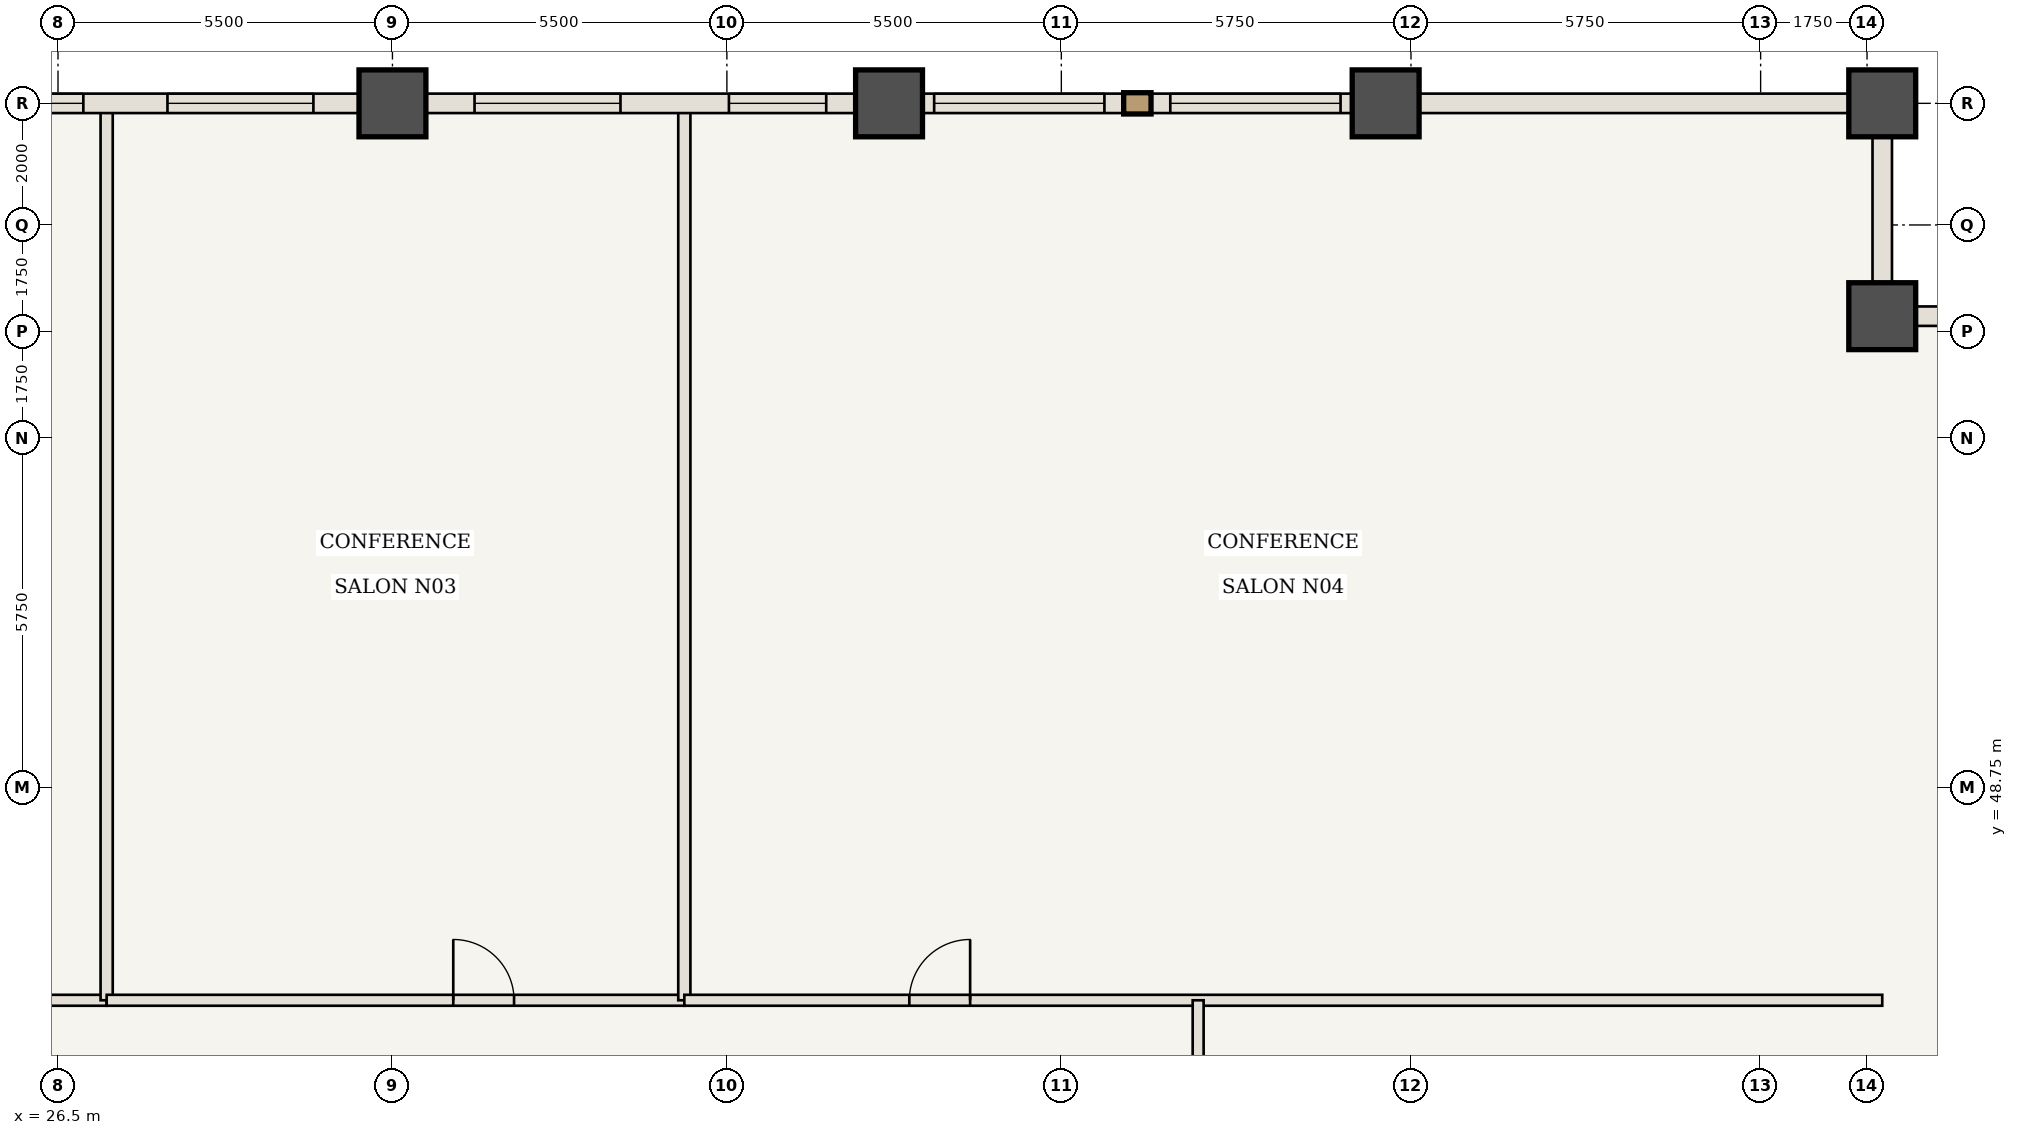
"""IFC4 building model, lengths in metres.
Left out: names, types, materials, properties, quantities, classifications, styles, units other than length and angle.
Written with IfcOpenShell. Run it as: python <this file> out.ifc"""

import sys

from ifc_helpers import new_model, si_unit, direction, frame, frame_2d, origin, origin_2d, place, context, subcontext, project, spatial, rectangle, extrude, element, fill, save


model = new_model("IFC4")
c1 = context("Model", 3, precision=1e-05, world=origin(), true_north=direction((0.0, 1.0)))
c2 = subcontext(c1, "Body", "Model", "MODEL_VIEW")
j1 = project(units=[si_unit("LENGTHUNIT", "METRE"), si_unit("PLANEANGLEUNIT", "RADIAN")], contexts=[c1])
p1 = place(None, origin())
s1 = spatial("IfcSite", under=j1, at=p1, CompositionType="ELEMENT")
p2 = place(p1, origin())
s2 = spatial("IfcBuilding", under=s1, at=p2, CompositionType="ELEMENT")
p3 = place(p2, frame((0.0, 0.0, 85.75)))
s3 = spatial("IfcBuildingStorey", under=s2, at=p3, CompositionType="ELEMENT", Elevation=85.75)
for number, where, z_axis, x_axis in (
    (1, (56.5, 56.5, 0.0), (0.0, 0.0, 1.0), (1.0, 0.0, 0.0)),
    (2, (56.5, 60.0, 0.0), (0.0, 0.0, 1.0), (1.0, 0.0, 0.0)),
    (3, (32.0, 60.0, 0.0), (0.0, 0.0, 1.0), (1.0, 0.0, 0.0)),
    (4, (40.167, 60.0, 0.0), (0.0, 0.0, 1.0), (1.0, 0.0, 0.0)),
    (5, (48.333, 60.0, 0.0), (0.0, 0.0, 1.0), (1.0, 0.0, 0.0)),
):
    element("IfcColumn", number, at=place(p3, frame(where, z_axis=z_axis, x_axis=x_axis)), inside=s3, PredefinedType="COLUMN", context=c2, shape_type="SweptSolid", body=[
        extrude(rectangle(XDim=1.1, YDim=1.1, at=origin_2d()), origin(), (0.0, 0.0, 1.0), 3.5),
    ])
p4 = place(p3, frame((22.5, 45.25, 0.0), z_axis=(0.0, 0.0, 1.0), x_axis=(1.0, 0.0, 0.0)))
e6 = element("IfcWall", 6, at=p4, inside=s3, PredefinedType="STANDARD", context=c2, shape_type="SweptSolid", body=[
    extrude(rectangle(XDim=4.8, YDim=0.18, at=frame_2d((2.4, 0.0))), origin(), (0.0, 0.0, 1.0), 3.32),
])
p5 = place(p4, frame((1.9, 0.0, 0.0)))
e7 = element("IfcOpeningElement", 7, at=p5, cuts=e6, PredefinedType="OPENING", context=c2, shape_type="SweptSolid", body=[
    extrude(rectangle(XDim=1.0, YDim=2.15, at=frame_2d((0.5, 1.075))), frame((0.0, 0.1, 0.0), z_axis=(0.0, -1.0, 0.0), x_axis=(1.0, 0.0, 0.0)), (0.0, 0.0, 1.0), 0.2),
])
p6 = place(p3, frame((27.3, 45.25, 0.0), z_axis=(0.0, 0.0, 1.0), x_axis=(0.0, 1.0, 0.0)))
e8 = element("IfcWall", 8, at=p6, inside=s3, PredefinedType="STANDARD", context=c2, shape_type="SweptSolid", body=[
    extrude(rectangle(XDim=14.69, YDim=0.2, at=frame_2d((7.345, 0.0))), origin(), (0.0, 0.0, 1.0), 3.32),
])
p7 = place(p3, frame((27.3, 45.25, 0.0), z_axis=(0.0, 0.0, 1.0), x_axis=(1.0, 0.0, 0.0)))
e9 = element("IfcWall", 9, at=p7, inside=s3, PredefinedType="STANDARD", context=c2, shape_type="SweptSolid", body=[
    extrude(rectangle(XDim=9.5, YDim=0.18, at=frame_2d((4.75, 0.0))), origin(), (0.0, 0.0, 1.0), 3.32),
])
p8 = place(p7, frame((5.7, 0.0, 0.0)))
e10 = element("IfcOpeningElement", 10, at=p8, cuts=e9, PredefinedType="OPENING", context=c2, shape_type="SweptSolid", body=[
    extrude(rectangle(XDim=1.0, YDim=2.15, at=frame_2d((0.5, 1.075))), frame((0.0, 0.1, 0.0), z_axis=(0.0, -1.0, 0.0), x_axis=(1.0, 0.0, 0.0)), (0.0, 0.0, 1.0), 0.2),
])
p9 = place(p3, frame((36.8, 45.25, 0.0), z_axis=(0.0, 0.0, 1.0), x_axis=(0.0, 1.0, 0.0)))
e11 = element("IfcWall", 11, at=p9, inside=s3, PredefinedType="STANDARD", context=c2, shape_type="SweptSolid", body=[
    extrude(rectangle(XDim=14.69, YDim=0.2, at=frame_2d((7.345, 0.0))), origin(), (0.0, 0.0, 1.0), 3.32),
])
p10 = place(p3, frame((36.8, 45.25, 0.0), z_axis=(0.0, 0.0, 1.0), x_axis=(1.0, 0.0, 0.0)))
e12 = element("IfcWall", 12, at=p10, inside=s3, PredefinedType="STANDARD", context=c2, shape_type="SweptSolid", body=[
    extrude(rectangle(XDim=19.7, YDim=0.18, at=frame_2d((9.85, 0.0))), origin(), (0.0, 0.0, 1.0), 3.32),
])
p11 = place(p10, frame((3.7, 0.0, 0.0)))
e13 = element("IfcOpeningElement", 13, at=p11, cuts=e12, PredefinedType="OPENING", context=c2, shape_type="SweptSolid", body=[
    extrude(rectangle(XDim=1.0, YDim=2.15, at=frame_2d((0.5, 1.075))), frame((0.0, 0.1, 0.0), z_axis=(0.0, -1.0, 0.0), x_axis=(1.0, 0.0, 0.0)), (0.0, 0.0, 1.0), 0.2),
])
p12 = place(p3, frame((45.25, 31.0, 0.0), z_axis=(0.0, 0.0, 1.0), x_axis=(0.0, 1.0, 0.0)))
e14 = element("IfcWall", 14, at=p12, inside=s3, PredefinedType="STANDARD", context=c2, shape_type="SweptSolid", body=[
    extrude(rectangle(XDim=14.25, YDim=0.18, at=frame_2d((7.125, 0.0))), origin(), (0.0, 0.0, 1.0), 3.32),
])
p13 = place(p12, frame((6.625, 0.0, 0.0)))
e15 = element("IfcOpeningElement", 15, at=p13, cuts=e14, PredefinedType="OPENING", context=c2, shape_type="SweptSolid", body=[
    extrude(rectangle(XDim=1.0, YDim=2.15, at=frame_2d((0.5, 1.075))), frame((0.0, 0.1, 0.0), z_axis=(0.0, -1.0, 0.0), x_axis=(1.0, 0.0, 0.0)), (0.0, 0.0, 1.0), 0.2),
])
p14 = place(p3, frame((23.833, 60.0, 0.0), z_axis=(0.0, 0.0, 1.0), x_axis=(1.0, 0.0, 0.0)))
e16 = element("IfcWall", 16, at=p14, inside=s3, PredefinedType="USERDEFINED", context=c2, shape_type="SweptSolid", body=[
    extrude(rectangle(XDim=8.167, YDim=0.32, at=frame_2d((4.083, 0.0))), origin(), (0.0, 0.0, 1.0), 2.52),
])
p15 = place(p14, frame((0.683, 0.0, 0.85)))
e17 = element("IfcOpeningElement", 17, at=p15, cuts=e16, PredefinedType="OPENING", context=c2, shape_type="SweptSolid", body=[
    extrude(rectangle(XDim=2.4, YDim=1.47, at=frame_2d((1.2, 0.735))), frame((0.0, 0.17, 0.0), z_axis=(0.0, -1.0, 0.0), x_axis=(1.0, 0.0, 0.0)), (0.0, 0.0, 1.0), 0.34),
])
p16 = place(p14, frame((4.467, 0.0, 0.85)))
e18 = element("IfcOpeningElement", 18, at=p16, cuts=e16, PredefinedType="OPENING", context=c2, shape_type="SweptSolid", body=[
    extrude(rectangle(XDim=2.4, YDim=1.47, at=frame_2d((1.2, 0.735))), frame((0.0, 0.17, 0.0), z_axis=(0.0, -1.0, 0.0), x_axis=(1.0, 0.0, 0.0)), (0.0, 0.0, 1.0), 0.34),
])
p17 = place(p3, frame((32.0, 60.0, 0.0), z_axis=(0.0, 0.0, 1.0), x_axis=(1.0, 0.0, 0.0)))
e19 = element("IfcWall", 19, at=p17, inside=s3, PredefinedType="USERDEFINED", context=c2, shape_type="SweptSolid", body=[
    extrude(rectangle(XDim=8.167, YDim=0.32, at=frame_2d((4.083, 0.0))), origin(), (0.0, 0.0, 1.0), 2.52),
])
p18 = place(p17, frame((1.35, 0.0, 0.85)))
e20 = element("IfcOpeningElement", 20, at=p18, cuts=e19, PredefinedType="OPENING", context=c2, shape_type="SweptSolid", body=[
    extrude(rectangle(XDim=2.4, YDim=1.47, at=frame_2d((1.2, 0.735))), frame((0.0, 0.17, 0.0), z_axis=(0.0, -1.0, 0.0), x_axis=(1.0, 0.0, 0.0)), (0.0, 0.0, 1.0), 0.34),
])
p19 = place(p17, frame((5.533, 0.0, 0.85)))
e21 = element("IfcOpeningElement", 21, at=p19, cuts=e19, PredefinedType="OPENING", context=c2, shape_type="SweptSolid", body=[
    extrude(rectangle(XDim=1.6, YDim=1.47, at=frame_2d((0.8, 0.735))), frame((0.0, 0.17, 0.0), z_axis=(0.0, -1.0, 0.0), x_axis=(1.0, 0.0, 0.0)), (0.0, 0.0, 1.0), 0.34),
])
p20 = place(p3, frame((40.167, 60.0, 0.0), z_axis=(0.0, 0.0, 1.0), x_axis=(1.0, 0.0, 0.0)))
e22 = element("IfcWall", 22, at=p20, inside=s3, PredefinedType="USERDEFINED", context=c2, shape_type="SweptSolid", body=[
    extrude(rectangle(XDim=8.167, YDim=0.32, at=frame_2d((4.083, 0.0))), origin(), (0.0, 0.0, 1.0), 2.52),
])
p21 = place(p20, frame((0.742, 0.0, 0.85)))
e23 = element("IfcOpeningElement", 23, at=p21, cuts=e22, PredefinedType="OPENING", context=c2, shape_type="SweptSolid", body=[
    extrude(rectangle(XDim=2.8, YDim=1.47, at=frame_2d((1.4, 0.735))), frame((0.0, 0.17, 0.0), z_axis=(0.0, -1.0, 0.0), x_axis=(1.0, 0.0, 0.0)), (0.0, 0.0, 1.0), 0.34),
])
p22 = place(p20, frame((4.625, 0.0, 0.85)))
e24 = element("IfcOpeningElement", 24, at=p22, cuts=e22, PredefinedType="OPENING", context=c2, shape_type="SweptSolid", body=[
    extrude(rectangle(XDim=2.8, YDim=1.47, at=frame_2d((1.4, 0.735))), frame((0.0, 0.17, 0.0), z_axis=(0.0, -1.0, 0.0), x_axis=(1.0, 0.0, 0.0)), (0.0, 0.0, 1.0), 0.34),
])
p23 = place(p3, frame((48.333, 60.0, 0.0), z_axis=(0.0, 0.0, 1.0), x_axis=(1.0, 0.0, 0.0)))
e25 = element("IfcWall", 25, at=p23, inside=s3, PredefinedType="USERDEFINED", context=c2, shape_type="SweptSolid", body=[
    extrude(rectangle(XDim=8.167, YDim=0.32, at=frame_2d((4.083, 0.0))), origin(), (0.0, 0.0, 1.0), 2.52),
])
for number, where, z_axis, x_axis in (
    (26, (56.5, 56.5, 0.0), (0.0, 0.0, 1.0), (1.0, 0.0, 0.0)),
    (27, (56.5, 60.0, 0.0), (0.0, 0.0, 1.0), (0.0, -1.0, 0.0)),
):
    element("IfcWall", number, at=place(p3, frame(where, z_axis=z_axis, x_axis=x_axis)), inside=s3, PredefinedType="USERDEFINED", context=c2, shape_type="SweptSolid", body=[
        extrude(rectangle(XDim=3.5, YDim=0.32, at=frame_2d((1.75, 0.0))), origin(), (0.0, 0.0, 1.0), 2.52),
    ])
p24 = place(p8, origin())
e28 = element("IfcDoor", 28, at=p24, inside=s3, OperationType="SINGLE_SWING_LEFT", PredefinedType="DOOR", context=c2, shape_type="SweptSolid", body=[
    extrude(rectangle(XDim=1.0, YDim=2.15, at=frame_2d((0.5, 1.075))), frame((0.0, 0.025, 0.0), z_axis=(0.0, -1.0, 0.0), x_axis=(1.0, 0.0, 0.0)), (0.0, 0.0, 1.0), 0.05),
])
fill(e10, e28)
p25 = place(p11, origin())
e29 = element("IfcDoor", 29, at=p25, inside=s3, OperationType="SINGLE_SWING_RIGHT", PredefinedType="DOOR", context=c2, shape_type="SweptSolid", body=[
    extrude(rectangle(XDim=1.0, YDim=2.15, at=frame_2d((0.5, 1.075))), frame((0.0, 0.025, 0.0), z_axis=(0.0, -1.0, 0.0), x_axis=(1.0, 0.0, 0.0)), (0.0, 0.0, 1.0), 0.05),
])
fill(e13, e29)
p26 = place(p15, origin())
e30 = element("IfcWindow", 30, at=p26, inside=s3, PartitioningType="SINGLE_PANEL", PredefinedType="WINDOW", context=c2, shape_type="SweptSolid", body=[
    extrude(rectangle(XDim=2.4, YDim=1.47, at=frame_2d((1.2, 0.735))), frame((0.0, 0.03, 0.0), z_axis=(0.0, -1.0, 0.0), x_axis=(1.0, 0.0, 0.0)), (0.0, 0.0, 1.0), 0.06),
])
fill(e17, e30)
p27 = place(p16, origin())
e31 = element("IfcWindow", 31, at=p27, inside=s3, PartitioningType="SINGLE_PANEL", PredefinedType="WINDOW", context=c2, shape_type="SweptSolid", body=[
    extrude(rectangle(XDim=2.4, YDim=1.47, at=frame_2d((1.2, 0.735))), frame((0.0, 0.03, 0.0), z_axis=(0.0, -1.0, 0.0), x_axis=(1.0, 0.0, 0.0)), (0.0, 0.0, 1.0), 0.06),
])
fill(e18, e31)
p28 = place(p18, origin())
e32 = element("IfcWindow", 32, at=p28, inside=s3, PartitioningType="SINGLE_PANEL", PredefinedType="WINDOW", context=c2, shape_type="SweptSolid", body=[
    extrude(rectangle(XDim=2.4, YDim=1.47, at=frame_2d((1.2, 0.735))), frame((0.0, 0.03, 0.0), z_axis=(0.0, -1.0, 0.0), x_axis=(1.0, 0.0, 0.0)), (0.0, 0.0, 1.0), 0.06),
])
fill(e20, e32)
p29 = place(p19, origin())
e33 = element("IfcWindow", 33, at=p29, inside=s3, PartitioningType="SINGLE_PANEL", PredefinedType="WINDOW", context=c2, shape_type="SweptSolid", body=[
    extrude(rectangle(XDim=1.6, YDim=1.47, at=frame_2d((0.8, 0.735))), frame((0.0, 0.03, 0.0), z_axis=(0.0, -1.0, 0.0), x_axis=(1.0, 0.0, 0.0)), (0.0, 0.0, 1.0), 0.06),
])
fill(e21, e33)
p30 = place(p21, origin())
e34 = element("IfcWindow", 34, at=p30, inside=s3, PartitioningType="SINGLE_PANEL", PredefinedType="WINDOW", context=c2, shape_type="SweptSolid", body=[
    extrude(rectangle(XDim=2.8, YDim=1.47, at=frame_2d((1.4, 0.735))), frame((0.0, 0.03, 0.0), z_axis=(0.0, -1.0, 0.0), x_axis=(1.0, 0.0, 0.0)), (0.0, 0.0, 1.0), 0.06),
])
fill(e23, e34)
p31 = place(p22, origin())
e35 = element("IfcWindow", 35, at=p31, inside=s3, PartitioningType="SINGLE_PANEL", PredefinedType="WINDOW", context=c2, shape_type="SweptSolid", body=[
    extrude(rectangle(XDim=2.8, YDim=1.47, at=frame_2d((1.4, 0.735))), frame((0.0, 0.03, 0.0), z_axis=(0.0, -1.0, 0.0), x_axis=(1.0, 0.0, 0.0)), (0.0, 0.0, 1.0), 0.06),
])
fill(e24, e35)
save(model, sys.argv[1])
